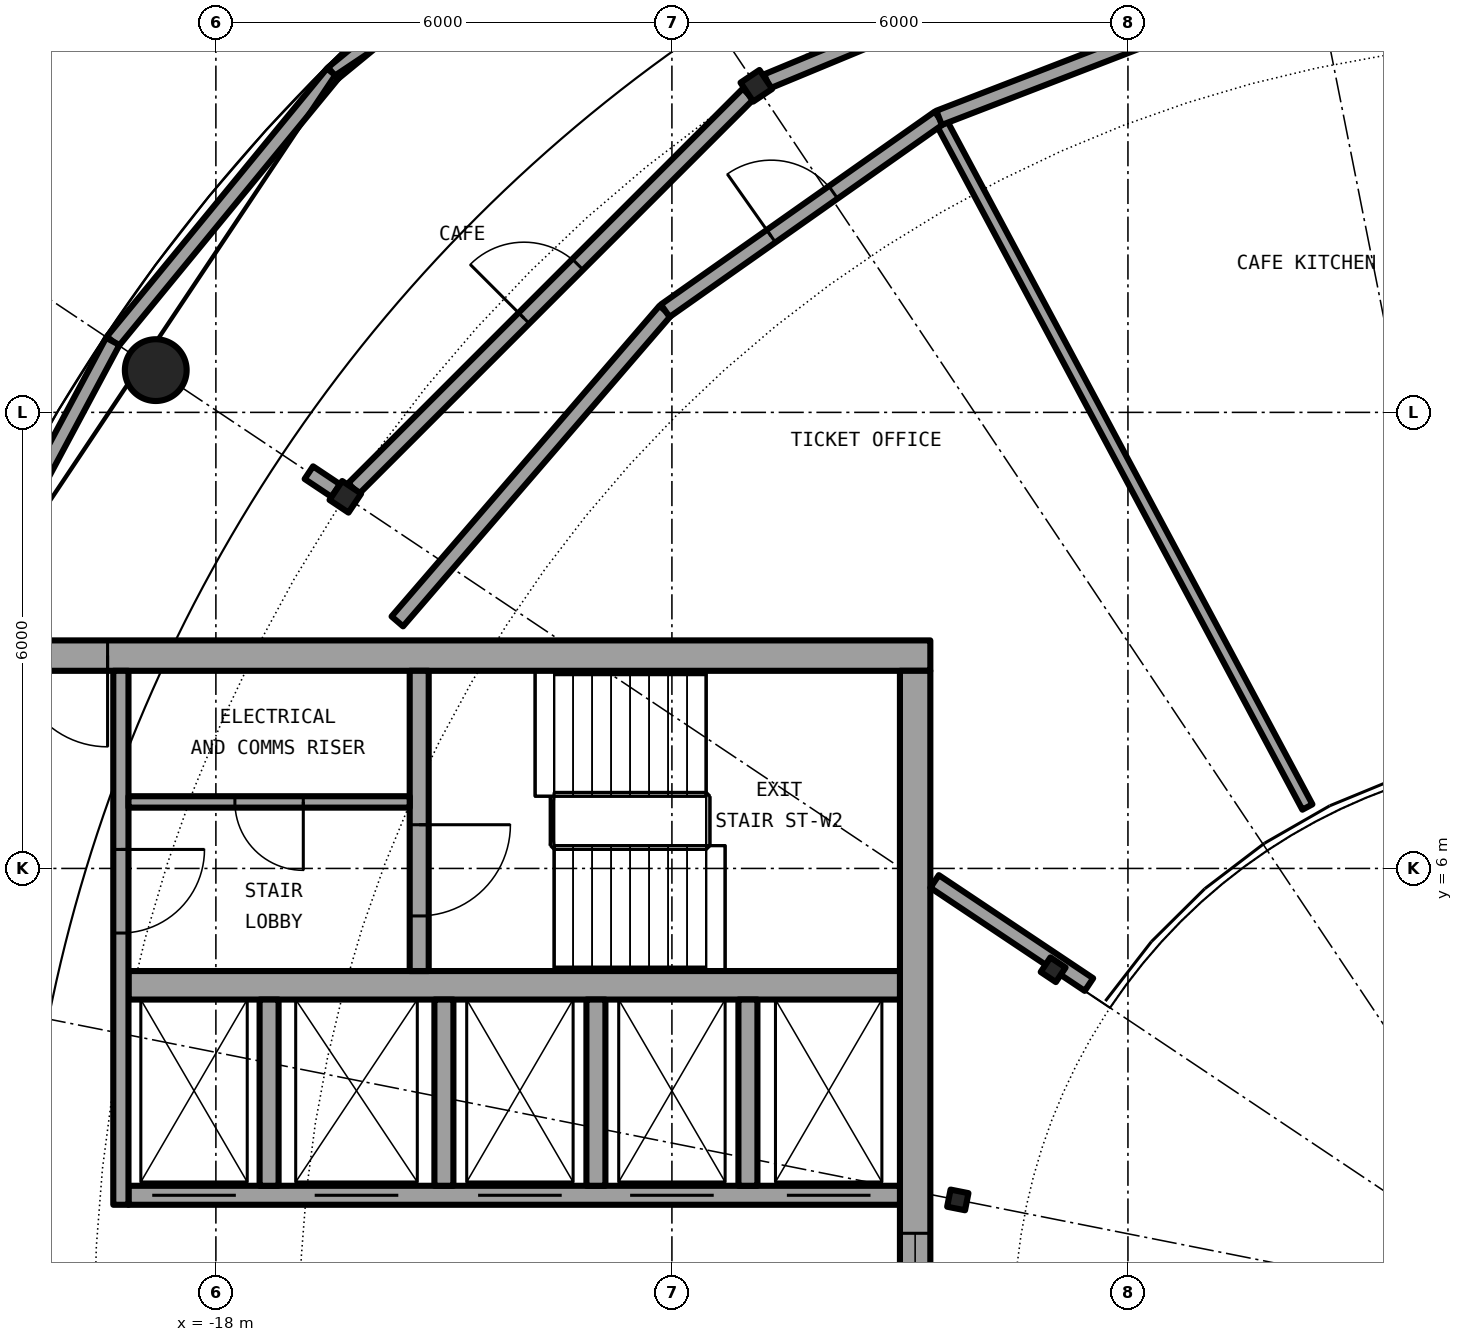
"""IFC4 building model, lengths in metres.
Left out: names, types, materials, properties, quantities, classifications, styles, units other than length and angle.
Written with IfcOpenShell. Run it as: python <this file> out.ifc"""

import sys

from ifc_helpers import new_model, si_unit, direction, frame, frame_2d, origin, origin_2d, place, context, subcontext, project, spatial, rectangle, hollow_circle, i_section, extrude, element, fill, save


model = new_model("IFC4")
c1 = context("Model", 3, precision=1e-05, world=origin(), true_north=direction((0.0, 1.0)))
c2 = subcontext(c1, "Body", "Model", "MODEL_VIEW")
j1 = project(units=[si_unit("LENGTHUNIT", "METRE"), si_unit("PLANEANGLEUNIT", "RADIAN")], contexts=[c1])
p1 = place(None, origin())
s1 = spatial("IfcSite", under=j1, at=p1, CompositionType="ELEMENT")
p2 = place(p1, origin())
s2 = spatial("IfcBuilding", under=s1, at=p2, CompositionType="ELEMENT")
p3 = place(p2, frame((0.0, 0.0, 255.4)))
s3 = spatial("IfcBuildingStorey", under=s2, at=p3, CompositionType="ELEMENT", Elevation=255.4)
p4 = place(p3, frame((-18.791, 12.556, 0.0), z_axis=(0.0, 0.0, 1.0), x_axis=(1.0, 0.0, 0.0)))
e1 = element("IfcColumn", 1, at=p4, inside=s3, PredefinedType="COLUMN", context=c2, shape_type="SweptSolid", body=[
    extrude(hollow_circle(Radius=0.406, WallThickness=0.03, at=origin_2d()), origin(), (0.0, 0.0, 1.0), 6.1),
])
for number, where, z_axis, x_axis in (
    (2, (-10.889, 16.297, 0.0), (0.0, 0.0, 1.0), (-0.556, 0.831, 0.0)),
    (3, (-16.297, 10.889, 0.0), (0.0, 0.0, 1.0), (-0.831, 0.556, 0.0)),
):
    element("IfcColumn", number, at=place(p3, frame(where, z_axis=z_axis, x_axis=x_axis)), inside=s3, PredefinedType="COLUMN", context=c2, shape_type="SweptSolid", body=[
        extrude(i_section(OverallWidth=0.3, OverallDepth=0.3, WebThickness=0.011, FlangeThickness=0.019, FilletRadius=0.027, at=origin_2d()), origin(), (0.0, 0.0, 1.0), 6.1),
    ])
for number, where, z_axis, x_axis in (
    (4, (-6.984, 4.667, 0.0), (0.0, 0.0, 1.0), (-0.831, 0.556, 0.0)),
    (5, (-8.239, 1.639, 0.0), (0.0, 0.0, 1.0), (-0.981, 0.195, 0.0)),
):
    element("IfcColumn", number, at=place(p3, frame(where, z_axis=z_axis, x_axis=x_axis)), inside=s3, PredefinedType="COLUMN", context=c2, shape_type="SweptSolid", body=[
        extrude(i_section(OverallWidth=0.24, OverallDepth=0.23, WebThickness=0.008, FlangeThickness=0.012, FilletRadius=0.021, at=origin_2d()), origin(), (0.0, 0.0, 1.0), 6.1),
    ])
for number, where, z_axis, x_axis in (
    (6, (-12.934, 19.357, 6.1), (0.0, 0.0, 1.0), (-0.773, -0.635, 0.0)),
    (7, (-16.461, 16.461, 6.1), (0.0, 0.0, 1.0), (-0.635, -0.773, 0.0)),
):
    element("IfcWall", number, at=place(p3, frame(where, z_axis=z_axis, x_axis=x_axis)), inside=s3, PredefinedType="PARAPET", context=c2, shape_type="SweptSolid", body=[
        extrude(rectangle(XDim=4.563, YDim=0.2, at=frame_2d((2.282, 0.0))), origin(), (0.0, 0.0, 1.0), 1.1),
    ])
p5 = place(p3, frame((-19.357, 12.934, 6.1), z_axis=(0.0, 0.0, 1.0), x_axis=(-0.471334945511, -0.881954289711, 0.0)))
e8 = element("IfcWall", 8, at=p5, inside=s3, PredefinedType="PARAPET", context=c2, shape_type="SweptSolid", body=[
    extrude(rectangle(XDim=4.564, YDim=0.2, at=frame_2d((2.282, 0.0))), origin(), (0.0, 0.0, 1.0), 1.1),
])
p6 = place(p3, frame((-8.6, 8.8, 0.0), z_axis=(0.0, 0.0, 1.0), x_axis=(-1.0, 0.0, 0.0)))
e9 = element("IfcWall", 9, at=p6, inside=s3, PredefinedType="SHEAR", context=c2, shape_type="SweptSolid", body=[
    extrude(rectangle(XDim=12.5, YDim=0.4, at=frame_2d((6.25, 0.0))), origin(), (0.0, 0.0, 1.0), 6.1),
])
p7 = place(p6, frame((10.825, 0.0, 0.0)))
e10 = element("IfcOpeningElement", 10, at=p7, cuts=e9, PredefinedType="OPENING", context=c2, shape_type="SweptSolid", body=[
    extrude(rectangle(XDim=1.2, YDim=2.3, at=frame_2d((0.6, 1.15))), frame((0.0, 0.21, 0.0), z_axis=(0.0, -1.0, 0.0), x_axis=(1.0, 0.0, 0.0)), (0.0, 0.0, 1.0), 0.42),
])
p8 = place(p3, frame((-8.8, 8.6, 0.0), z_axis=(0.0, 0.0, 1.0), x_axis=(0.0, -1.0, 0.0)))
e11 = element("IfcWall", 11, at=p8, inside=s3, PredefinedType="SHEAR", context=c2, shape_type="SweptSolid", body=[
    extrude(rectangle(XDim=17.2, YDim=0.4, at=frame_2d((8.6, 0.0))), origin(), (0.0, 0.0, 1.0), 6.1),
])
p9 = place(p8, frame((7.4, 0.0, 0.1)))
e12 = element("IfcOpeningElement", 12, at=p9, cuts=e11, PredefinedType="OPENING", context=c2, shape_type="SweptSolid", body=[
    extrude(rectangle(XDim=2.4, YDim=2.2, at=frame_2d((1.2, 1.1))), frame((0.0, 0.21, 0.0), z_axis=(0.0, -1.0, 0.0), x_axis=(1.0, 0.0, 0.0)), (0.0, 0.0, 1.0), 0.42),
])
p10 = place(p3, frame((-9.0, 1.7, 0.0), z_axis=(0.0, 0.0, 1.0), x_axis=(-1.0, 0.0, 0.0)))
e13 = element("IfcWall", 13, at=p10, inside=s3, PredefinedType="SHEAR", context=c2, shape_type="SweptSolid", body=[
    extrude(rectangle(XDim=10.15, YDim=0.25, at=frame_2d((5.075, 0.0))), origin(), (0.0, 0.0, 1.0), 6.1),
])
p11 = place(p10, frame((0.387, 0.0, 0.0)))
e14 = element("IfcOpeningElement", 14, at=p11, cuts=e13, PredefinedType="OPENING", context=c2, shape_type="SweptSolid", body=[
    extrude(rectangle(XDim=1.1, YDim=2.3, at=frame_2d((0.55, 1.15))), frame((0.0, 0.135, 0.0), z_axis=(0.0, -1.0, 0.0), x_axis=(1.0, 0.0, 0.0)), (0.0, 0.0, 1.0), 0.27),
])
p12 = place(p10, frame((2.45, 0.0, 0.0)))
e15 = element("IfcOpeningElement", 15, at=p12, cuts=e13, PredefinedType="OPENING", context=c2, shape_type="SweptSolid", body=[
    extrude(rectangle(XDim=1.1, YDim=2.3, at=frame_2d((0.55, 1.15))), frame((0.0, 0.135, 0.0), z_axis=(0.0, -1.0, 0.0), x_axis=(1.0, 0.0, 0.0)), (0.0, 0.0, 1.0), 0.27),
])
p13 = place(p10, frame((4.45, 0.0, 0.0)))
e16 = element("IfcOpeningElement", 16, at=p13, cuts=e13, PredefinedType="OPENING", context=c2, shape_type="SweptSolid", body=[
    extrude(rectangle(XDim=1.1, YDim=2.3, at=frame_2d((0.55, 1.15))), frame((0.0, 0.135, 0.0), z_axis=(0.0, -1.0, 0.0), x_axis=(1.0, 0.0, 0.0)), (0.0, 0.0, 1.0), 0.27),
])
p14 = place(p10, frame((6.6, 0.0, 0.0)))
e17 = element("IfcOpeningElement", 17, at=p14, cuts=e13, PredefinedType="OPENING", context=c2, shape_type="SweptSolid", body=[
    extrude(rectangle(XDim=1.1, YDim=2.3, at=frame_2d((0.55, 1.15))), frame((0.0, 0.135, 0.0), z_axis=(0.0, -1.0, 0.0), x_axis=(1.0, 0.0, 0.0)), (0.0, 0.0, 1.0), 0.27),
])
p15 = place(p10, frame((8.738, 0.0, 0.0)))
e18 = element("IfcOpeningElement", 18, at=p15, cuts=e13, PredefinedType="OPENING", context=c2, shape_type="SweptSolid", body=[
    extrude(rectangle(XDim=1.1, YDim=2.3, at=frame_2d((0.55, 1.15))), frame((0.0, 0.135, 0.0), z_axis=(0.0, -1.0, 0.0), x_axis=(1.0, 0.0, 0.0)), (0.0, 0.0, 1.0), 0.27),
])
p16 = place(p3, frame((-9.0, 4.462, 0.0), z_axis=(0.0, 0.0, 1.0), x_axis=(-1.0, 0.0, 0.0)))
e19 = element("IfcWall", 19, at=p16, inside=s3, PredefinedType="SHEAR", context=c2, shape_type="SweptSolid", body=[
    extrude(rectangle(XDim=10.15, YDim=0.375, at=frame_2d((5.075, 0.0))), origin(), (0.0, 0.0, 1.0), 6.1),
])
p17 = place(p3, frame((-15.325, 8.6, 0.0), z_axis=(0.0, 0.0, 1.0), x_axis=(0.0, -1.0, 0.0)))
e20 = element("IfcWall", 20, at=p17, inside=s3, PredefinedType="SHEAR", context=c2, shape_type="SweptSolid", body=[
    extrude(rectangle(XDim=3.95, YDim=0.25, at=frame_2d((1.975, 0.0))), origin(), (0.0, 0.0, 1.0), 6.1),
])
p18 = place(p17, frame((2.025, 0.0, 0.0)))
e21 = element("IfcOpeningElement", 21, at=p18, cuts=e20, PredefinedType="OPENING", context=c2, shape_type="SweptSolid", body=[
    extrude(rectangle(XDim=1.2, YDim=2.3, at=frame_2d((0.6, 1.15))), frame((0.0, 0.135, 0.0), z_axis=(0.0, -1.0, 0.0), x_axis=(1.0, 0.0, 0.0)), (0.0, 0.0, 1.0), 0.27),
])
for number, where, z_axis, x_axis in (
    (22, (-15.0, 1.825, 0.0), (0.0, 0.0, 1.0), (0.0, 1.0, 0.0)),
    (23, (-17.3, 1.825, 0.0), (0.0, 0.0, 1.0), (0.0, 1.0, 0.0)),
):
    element("IfcWall", number, at=place(p3, frame(where, z_axis=z_axis, x_axis=x_axis)), inside=s3, PredefinedType="SOLIDWALL", context=c2, shape_type="SweptSolid", body=[
        extrude(rectangle(XDim=2.45, YDim=0.25, at=frame_2d((1.225, 0.0))), origin(), (0.0, 0.0, 1.0), 5.75),
    ])
p19 = place(p3, frame((-19.25, 8.6, 0.0), z_axis=(0.0, 0.0, 1.0), x_axis=(0.0, -1.0, 0.0)))
e24 = element("IfcWall", 24, at=p19, inside=s3, PredefinedType="SOLIDWALL", context=c2, shape_type="SweptSolid", body=[
    extrude(rectangle(XDim=7.025, YDim=0.2, at=frame_2d((3.513, 0.0))), origin(), (0.0, 0.0, 1.0), 5.75),
])
p20 = place(p19, frame((2.35, 0.0, 0.0)))
e25 = element("IfcOpeningElement", 25, at=p20, cuts=e24, PredefinedType="OPENING", context=c2, shape_type="SweptSolid", body=[
    extrude(rectangle(XDim=1.1, YDim=2.3, at=frame_2d((0.55, 1.15))), frame((0.0, 0.11, 0.0), z_axis=(0.0, -1.0, 0.0), x_axis=(1.0, 0.0, 0.0)), (0.0, 0.0, 1.0), 0.22),
])
for number, where, z_axis, x_axis in (
    (26, (-11.0, 1.825, 0.0), (0.0, 0.0, 1.0), (0.0, 1.0, 0.0)),
    (27, (-13.0, 1.825, 0.0), (0.0, 0.0, 1.0), (0.0, 1.0, 0.0)),
):
    element("IfcWall", number, at=place(p3, frame(where, z_axis=z_axis, x_axis=x_axis)), inside=s3, PredefinedType="SOLIDWALL", context=c2, shape_type="SweptSolid", body=[
        extrude(rectangle(XDim=2.45, YDim=0.25, at=frame_2d((1.225, 0.0))), origin(), (0.0, 0.0, 1.0), 5.75),
    ])
p21 = place(p3, frame((-15.45, 6.875, 0.0), z_axis=(0.0, 0.0, 1.0), x_axis=(-1.0, 0.0, 0.0)))
e28 = element("IfcWall", 28, at=p21, inside=s3, PredefinedType="PARTITIONING", context=c2, shape_type="SweptSolid", body=[
    extrude(rectangle(XDim=3.7, YDim=0.15, at=frame_2d((1.85, 0.0))), origin(), (0.0, 0.0, 1.0), 5.75),
])
p22 = place(p21, frame((1.4, 0.0, 0.0)))
e29 = element("IfcOpeningElement", 29, at=p22, cuts=e28, PredefinedType="OPENING", context=c2, shape_type="SweptSolid", body=[
    extrude(rectangle(XDim=0.9, YDim=2.3, at=frame_2d((0.45, 1.15))), frame((0.0, 0.085, 0.0), z_axis=(0.0, -1.0, 0.0), x_axis=(1.0, 0.0, 0.0)), (0.0, 0.0, 1.0), 0.17),
])
p23 = place(p3, frame((-16.777, 11.207, 0.0), z_axis=(0.0, 0.0, 1.0), x_axis=(0.831962011971, -0.554832596949, 0.0)))
e30 = element("IfcWall", 30, at=p23, inside=s3, PredefinedType="PARTITIONING", context=c2, shape_type="SweptSolid", body=[
    extrude(rectangle(XDim=0.426, YDim=0.2, at=frame_2d((0.213, 0.0))), origin(), (0.0, 0.0, 1.0), 5.75),
])
p24 = place(p3, frame((-8.485, 15.875, 0.0), z_axis=(0.0, 0.0, 1.0), x_axis=(0.471384277318, -0.881927923981, 0.0)))
e31 = element("IfcWall", 31, at=p24, inside=s3, PredefinedType="PARTITIONING", context=c2, shape_type="SweptSolid", body=[
    extrude(rectangle(XDim=10.281, YDim=0.15, at=frame_2d((5.14, 0.0))), origin(), (0.0, 0.0, 1.0), 5.75),
])
p25 = place(p3, frame((-6.513, 4.472, 0.0), z_axis=(0.0, 0.0, 1.0), x_axis=(-0.831450132577, 0.555599385382, 0.0)))
e32 = element("IfcWall", 32, at=p25, inside=s3, PredefinedType="PARTITIONING", context=c2, shape_type="SweptSolid", body=[
    extrude(rectangle(XDim=2.443, YDim=0.2, at=frame_2d((1.221, 0.0))), origin(), (0.0, 0.0, 1.0), 5.75),
])
p26 = place(p3, frame((-15.613, 9.25, 0.0), z_axis=(0.0, 0.0, 1.0), x_axis=(0.653146301984, 0.757231740093, 0.0)))
e33 = element("IfcWall", 33, at=p26, inside=s3, PredefinedType="PARTITIONING", context=c2, shape_type="SweptSolid", body=[
    extrude(rectangle(XDim=5.397, YDim=0.2, at=frame_2d((2.699, 0.0))), origin(), (0.0, 0.0, 1.0), 5.75),
])
p27 = place(p3, frame((-12.088, 13.337, 0.0), z_axis=(0.0, 0.0, 1.0), x_axis=(0.817507922666, 0.575917352038, 0.0)))
e34 = element("IfcWall", 34, at=p27, inside=s3, PredefinedType="PARTITIONING", context=c2, shape_type="SweptSolid", body=[
    extrude(rectangle(XDim=4.407, YDim=0.2, at=frame_2d((2.204, 0.0))), origin(), (0.0, 0.0, 1.0), 5.75),
])
p28 = place(p27, frame((1.704, 0.0, 0.0)))
e35 = element("IfcOpeningElement", 35, at=p28, cuts=e34, PredefinedType="OPENING", context=c2, shape_type="SweptSolid", body=[
    extrude(rectangle(XDim=1.0, YDim=2.3, at=frame_2d((0.5, 1.15))), frame((0.0, 0.11, 0.0), z_axis=(0.0, -1.0, 0.0), x_axis=(1.0, 0.0, 0.0)), (0.0, 0.0, 1.0), 0.22),
])
p29 = place(p3, frame((-8.485, 15.875, 0.0), z_axis=(0.0, 0.0, 1.0), x_axis=(0.932983851272, 0.35991823136, 0.0)))
e36 = element("IfcWall", 36, at=p29, inside=s3, PredefinedType="PARTITIONING", context=c2, shape_type="SweptSolid", body=[
    extrude(rectangle(XDim=4.406, YDim=0.2, at=frame_2d((2.203, 0.0))), origin(), (0.0, 0.0, 1.0), 5.75),
])
p30 = place(p3, frame((-16.189, 10.997, 0.0), z_axis=(0.0, 0.0, 1.0), x_axis=(0.707106781187, 0.707106781187, 0.0)))
e37 = element("IfcWall", 37, at=p30, inside=s3, PredefinedType="PARTITIONING", context=c2, shape_type="SweptSolid", body=[
    extrude(rectangle(XDim=7.343, YDim=0.2, at=frame_2d((3.671, 0.0))), origin(), (0.0, 0.0, 1.0), 5.5),
])
p31 = place(p30, frame((3.171, 0.0, 0.0)))
e38 = element("IfcOpeningElement", 38, at=p31, cuts=e37, PredefinedType="OPENING", context=c2, shape_type="SweptSolid", body=[
    extrude(rectangle(XDim=1.0, YDim=2.3, at=frame_2d((0.5, 1.15))), frame((0.0, 0.11, 0.0), z_axis=(0.0, -1.0, 0.0), x_axis=(1.0, 0.0, 0.0)), (0.0, 0.0, 1.0), 0.22),
])
p32 = place(p3, frame((-10.748, 16.355, 0.0), z_axis=(0.0, 0.0, 1.0), x_axis=(0.923857139404, 0.382737489635, 0.0)))
e39 = element("IfcWall", 39, at=p32, inside=s3, PredefinedType="PARTITIONING", context=c2, shape_type="SweptSolid", body=[
    extrude(rectangle(XDim=7.342, YDim=0.2, at=frame_2d((3.671, 0.0))), origin(), (0.0, 0.0, 1.0), 5.5),
])
p33 = place(p11, origin())
e40 = element("IfcDoor", 40, at=p33, inside=s3, OperationType="DOUBLE_DOOR_SLIDING", PredefinedType="DOOR", context=c2, shape_type="SweptSolid", body=[
    extrude(rectangle(XDim=1.1, YDim=2.3, at=frame_2d((0.55, 1.15))), frame((0.0, 0.025, 0.0), z_axis=(0.0, -1.0, 0.0), x_axis=(1.0, 0.0, 0.0)), (0.0, 0.0, 1.0), 0.05),
])
fill(e14, e40)
p34 = place(p12, origin())
e41 = element("IfcDoor", 41, at=p34, inside=s3, OperationType="DOUBLE_DOOR_SLIDING", PredefinedType="DOOR", context=c2, shape_type="SweptSolid", body=[
    extrude(rectangle(XDim=1.1, YDim=2.3, at=frame_2d((0.55, 1.15))), frame((0.0, 0.025, 0.0), z_axis=(0.0, -1.0, 0.0), x_axis=(1.0, 0.0, 0.0)), (0.0, 0.0, 1.0), 0.05),
])
fill(e15, e41)
p35 = place(p13, origin())
e42 = element("IfcDoor", 42, at=p35, inside=s3, OperationType="DOUBLE_DOOR_SLIDING", PredefinedType="DOOR", context=c2, shape_type="SweptSolid", body=[
    extrude(rectangle(XDim=1.1, YDim=2.3, at=frame_2d((0.55, 1.15))), frame((0.0, 0.025, 0.0), z_axis=(0.0, -1.0, 0.0), x_axis=(1.0, 0.0, 0.0)), (0.0, 0.0, 1.0), 0.05),
])
fill(e16, e42)
p36 = place(p14, origin())
e43 = element("IfcDoor", 43, at=p36, inside=s3, OperationType="DOUBLE_DOOR_SLIDING", PredefinedType="DOOR", context=c2, shape_type="SweptSolid", body=[
    extrude(rectangle(XDim=1.1, YDim=2.3, at=frame_2d((0.55, 1.15))), frame((0.0, 0.025, 0.0), z_axis=(0.0, -1.0, 0.0), x_axis=(1.0, 0.0, 0.0)), (0.0, 0.0, 1.0), 0.05),
])
fill(e17, e43)
p37 = place(p15, origin())
e44 = element("IfcDoor", 44, at=p37, inside=s3, OperationType="DOUBLE_DOOR_SLIDING", PredefinedType="DOOR", context=c2, shape_type="SweptSolid", body=[
    extrude(rectangle(XDim=1.1, YDim=2.3, at=frame_2d((0.55, 1.15))), frame((0.0, 0.025, 0.0), z_axis=(0.0, -1.0, 0.0), x_axis=(1.0, 0.0, 0.0)), (0.0, 0.0, 1.0), 0.05),
])
fill(e18, e44)
p38 = place(p22, origin())
e45 = element("IfcDoor", 45, at=p38, inside=s3, OperationType="SINGLE_SWING_LEFT", PredefinedType="DOOR", context=c2, shape_type="SweptSolid", body=[
    extrude(rectangle(XDim=0.9, YDim=2.3, at=frame_2d((0.45, 1.15))), frame((0.0, 0.025, 0.0), z_axis=(0.0, -1.0, 0.0), x_axis=(1.0, 0.0, 0.0)), (0.0, 0.0, 1.0), 0.05),
])
fill(e29, e45)
p39 = place(p18, origin())
e46 = element("IfcDoor", 46, at=p39, inside=s3, OperationType="SINGLE_SWING_LEFT", PredefinedType="DOOR", context=c2, shape_type="SweptSolid", body=[
    extrude(rectangle(XDim=1.2, YDim=2.3, at=frame_2d((0.6, 1.15))), frame((0.0, 0.025, 0.0), z_axis=(0.0, -1.0, 0.0), x_axis=(1.0, 0.0, 0.0)), (0.0, 0.0, 1.0), 0.05),
])
fill(e21, e46)
p40 = place(p20, origin())
e47 = element("IfcDoor", 47, at=p40, inside=s3, OperationType="SINGLE_SWING_RIGHT", PredefinedType="DOOR", context=c2, shape_type="SweptSolid", body=[
    extrude(rectangle(XDim=1.1, YDim=2.3, at=frame_2d((0.55, 1.15))), frame((0.0, 0.025, 0.0), z_axis=(0.0, -1.0, 0.0), x_axis=(1.0, 0.0, 0.0)), (0.0, 0.0, 1.0), 0.05),
])
fill(e25, e47)
p41 = place(p7, origin())
e48 = element("IfcDoor", 48, at=p41, inside=s3, OperationType="SINGLE_SWING_LEFT", PredefinedType="DOOR", context=c2, shape_type="SweptSolid", body=[
    extrude(rectangle(XDim=1.2, YDim=2.3, at=frame_2d((0.6, 1.15))), frame((0.0, 0.025, 0.0), z_axis=(0.0, -1.0, 0.0), x_axis=(1.0, 0.0, 0.0)), (0.0, 0.0, 1.0), 0.05),
])
fill(e10, e48)
p42 = place(p9, origin())
e49 = element("IfcWindow", 49, at=p42, inside=s3, PartitioningType="SINGLE_PANEL", PredefinedType="WINDOW", context=c2, shape_type="SweptSolid", body=[
    extrude(rectangle(XDim=2.4, YDim=2.2, at=frame_2d((1.2, 1.1))), frame((0.0, 0.03, 0.0), z_axis=(0.0, -1.0, 0.0), x_axis=(1.0, 0.0, 0.0)), (0.0, 0.0, 1.0), 0.06),
])
fill(e12, e49)
p43 = place(p31, origin())
e50 = element("IfcDoor", 50, at=p43, inside=s3, OperationType="SINGLE_SWING_RIGHT", PredefinedType="DOOR", context=c2, shape_type="SweptSolid", body=[
    extrude(rectangle(XDim=1.0, YDim=2.3, at=frame_2d((0.5, 1.15))), frame((0.0, 0.025, 0.0), z_axis=(0.0, -1.0, 0.0), x_axis=(1.0, 0.0, 0.0)), (0.0, 0.0, 1.0), 0.05),
])
fill(e38, e50)
p44 = place(p28, origin())
e51 = element("IfcDoor", 51, at=p44, inside=s3, OperationType="SINGLE_SWING_RIGHT", PredefinedType="DOOR", context=c2, shape_type="SweptSolid", body=[
    extrude(rectangle(XDim=1.0, YDim=2.3, at=frame_2d((0.5, 1.15))), frame((0.0, 0.025, 0.0), z_axis=(0.0, -1.0, 0.0), x_axis=(1.0, 0.0, 0.0)), (0.0, 0.0, 1.0), 0.05),
])
fill(e35, e51)
save(model, sys.argv[1])
